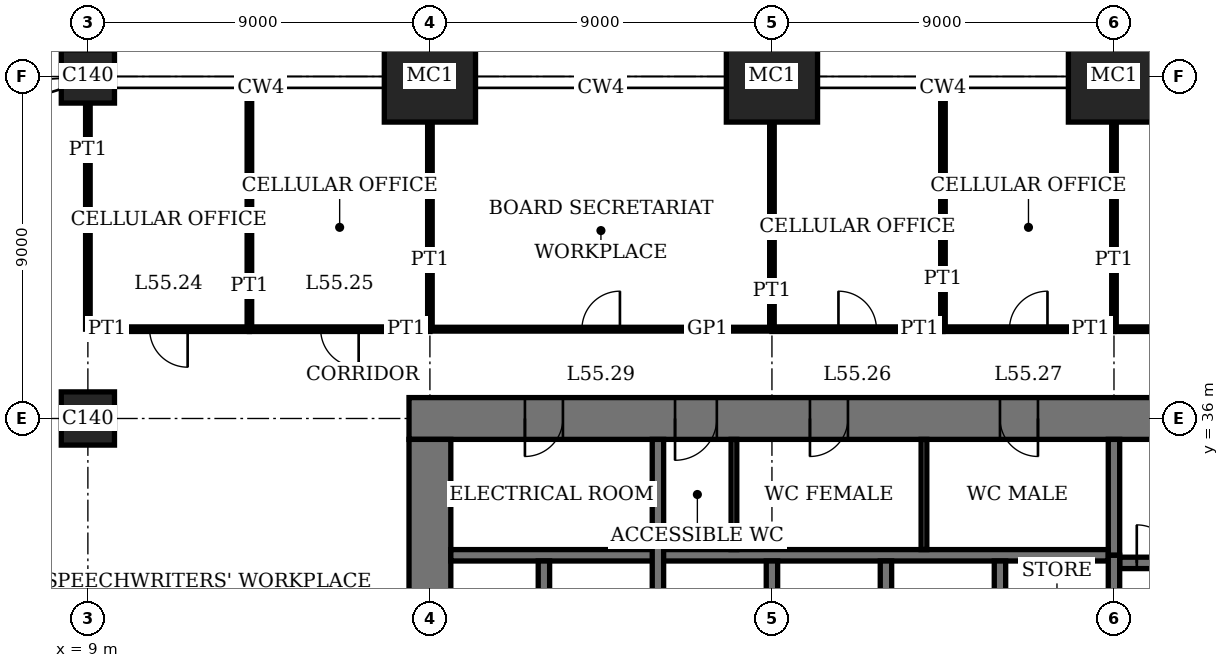
"""IFC4 building model, lengths in metres.
Left out: names, types, materials, properties, quantities, classifications, styles, units other than length and angle.
Written with IfcOpenShell. Run it as: python <this file> out.ifc"""

import sys

from ifc_helpers import new_model, si_unit, direction, frame, frame_2d, origin, origin_2d, place, context, subcontext, project, spatial, rectangle, extrude, element, fill, save


model = new_model("IFC4")
c1 = context("Model", 3, precision=1e-05, world=origin(), true_north=direction((0.0, 1.0)))
c2 = subcontext(c1, "Body", "Model", "MODEL_VIEW")
j1 = project(units=[si_unit("LENGTHUNIT", "METRE"), si_unit("PLANEANGLEUNIT", "RADIAN")], contexts=[c1])
p1 = place(None, origin())
s1 = spatial("IfcSite", under=j1, at=p1, CompositionType="ELEMENT")
p2 = place(p1, origin())
s2 = spatial("IfcBuilding", under=s1, at=p2, CompositionType="ELEMENT")
p3 = place(p2, frame((0.0, 0.0, 226.2)))
s3 = spatial("IfcBuildingStorey", under=s2, at=p3, CompositionType="ELEMENT", Elevation=226.2)
for number, where, z_axis, x_axis in (
    (1, (9.0, 36.0, 0.0), (0.0, 0.0, 1.0), (1.0, 0.0, 0.0)),
    (2, (9.0, 45.0, 0.0), (0.0, 0.0, 1.0), (1.0, 0.0, 0.0)),
):
    element("IfcColumn", number, at=place(p3, frame(where, z_axis=z_axis, x_axis=x_axis)), inside=s3, PredefinedType="COLUMN", context=c2, shape_type="SweptSolid", body=[
        extrude(rectangle(XDim=1.4, YDim=1.4, at=origin_2d()), origin(), (0.0, 0.0, 1.0), 4.0),
    ])
for number, where, z_axis, x_axis in (
    (3, (18.0, 45.0, 0.0), (0.0, 0.0, 1.0), (1.0, 0.0, 0.0)),
    (4, (27.0, 45.0, 0.0), (0.0, 0.0, 1.0), (1.0, 0.0, 0.0)),
    (5, (36.0, 45.0, 0.0), (0.0, 0.0, 1.0), (1.0, 0.0, 0.0)),
):
    element("IfcColumn", number, at=place(p3, frame(where, z_axis=z_axis, x_axis=x_axis)), inside=s3, PredefinedType="COLUMN", context=c2, shape_type="SweptSolid", body=[
        extrude(rectangle(XDim=2.4, YDim=2.4, at=origin_2d()), origin(), (0.0, 0.0, 1.0), 4.0),
    ])
p4 = place(p3, frame((45.55, 36.0, 0.0), z_axis=(0.0, 0.0, 1.0), x_axis=(-1.0, 0.0, 0.0)))
e6 = element("IfcWall", 6, at=p4, inside=s3, PredefinedType="SHEAR", context=c2, shape_type="SweptSolid", body=[
    extrude(rectangle(XDim=28.1, YDim=1.1, at=frame_2d((14.05, 0.0))), origin(), (0.0, 0.0, 1.0), 4.0),
])
p5 = place(p4, frame((11.55, 0.0, 0.0)))
e7 = element("IfcOpeningElement", 7, at=p5, cuts=e6, PredefinedType="OPENING", context=c2, shape_type="SweptSolid", body=[
    extrude(rectangle(XDim=1.0, YDim=2.4, at=frame_2d((0.5, 1.2))), frame((0.0, 0.56, 0.0), z_axis=(0.0, -1.0, 0.0), x_axis=(1.0, 0.0, 0.0)), (0.0, 0.0, 1.0), 1.12),
])
p6 = place(p4, frame((16.55, 0.0, 0.0)))
e8 = element("IfcOpeningElement", 8, at=p6, cuts=e6, PredefinedType="OPENING", context=c2, shape_type="SweptSolid", body=[
    extrude(rectangle(XDim=1.0, YDim=2.4, at=frame_2d((0.5, 1.2))), frame((0.0, 0.56, 0.0), z_axis=(0.0, -1.0, 0.0), x_axis=(1.0, 0.0, 0.0)), (0.0, 0.0, 1.0), 1.12),
])
p7 = place(p4, frame((20.0, 0.0, 0.0)))
e9 = element("IfcOpeningElement", 9, at=p7, cuts=e6, PredefinedType="OPENING", context=c2, shape_type="SweptSolid", body=[
    extrude(rectangle(XDim=1.1, YDim=2.4, at=frame_2d((0.55, 1.2))), frame((0.0, 0.56, 0.0), z_axis=(0.0, -1.0, 0.0), x_axis=(1.0, 0.0, 0.0)), (0.0, 0.0, 1.0), 1.12),
])
p8 = place(p4, frame((24.05, 0.0, 0.0)))
e10 = element("IfcOpeningElement", 10, at=p8, cuts=e6, PredefinedType="OPENING", context=c2, shape_type="SweptSolid", body=[
    extrude(rectangle(XDim=1.0, YDim=2.4, at=frame_2d((0.5, 1.2))), frame((0.0, 0.56, 0.0), z_axis=(0.0, -1.0, 0.0), x_axis=(1.0, 0.0, 0.0)), (0.0, 0.0, 1.0), 1.12),
])
p9 = place(p3, frame((18.0, 35.45, 0.0), z_axis=(0.0, 0.0, 1.0), x_axis=(0.0, -1.0, 0.0)))
e11 = element("IfcWall", 11, at=p9, inside=s3, PredefinedType="SHEAR", context=c2, shape_type="SweptSolid", body=[
    extrude(rectangle(XDim=16.9, YDim=1.1, at=frame_2d((8.45, 0.0))), origin(), (0.0, 0.0, 1.0), 4.0),
])
p10 = place(p9, frame((8.45, 0.0, 0.0)))
e12 = element("IfcOpeningElement", 12, at=p10, cuts=e11, PredefinedType="OPENING", context=c2, shape_type="SweptSolid", body=[
    extrude(rectangle(XDim=1.8, YDim=2.4, at=frame_2d((0.9, 1.2))), frame((0.0, 0.56, 0.0), z_axis=(0.0, -1.0, 0.0), x_axis=(1.0, 0.0, 0.0)), (0.0, 0.0, 1.0), 1.12),
])
p11 = place(p3, frame((36.15, 32.2, 0.0), z_axis=(0.0, 0.0, 1.0), x_axis=(1.0, 0.0, 0.0)))
e13 = element("IfcWall", 13, at=p11, inside=s3, PredefinedType="SHEAR", context=c2, shape_type="SweptSolid", body=[
    extrude(rectangle(XDim=8.3, YDim=0.3, at=frame_2d((4.15, 0.0))), origin(), (0.0, 0.0, 1.0), 4.0),
])
p12 = place(p11, frame((0.45, 0.0, 0.0)))
e14 = element("IfcOpeningElement", 14, at=p12, cuts=e13, PredefinedType="OPENING", context=c2, shape_type="SweptSolid", body=[
    extrude(rectangle(XDim=1.0, YDim=2.4, at=frame_2d((0.5, 1.2))), frame((0.0, 0.16, 0.0), z_axis=(0.0, -1.0, 0.0), x_axis=(1.0, 0.0, 0.0)), (0.0, 0.0, 1.0), 0.32),
])
p13 = place(p3, frame((36.0, 32.4, 0.0), z_axis=(0.0, 0.0, 1.0), x_axis=(0.0, 1.0, 0.0)))
e15 = element("IfcWall", 15, at=p13, inside=s3, PredefinedType="SHEAR", context=c2, shape_type="SweptSolid", body=[
    extrude(rectangle(XDim=3.05, YDim=0.3, at=frame_2d((1.525, 0.0))), origin(), (0.0, 0.0, 1.0), 4.0),
])
p14 = place(p3, frame((18.55, 32.4, 0.0), z_axis=(0.0, 0.0, 1.0), x_axis=(1.0, 0.0, 0.0)))
e16 = element("IfcWall", 16, at=p14, inside=s3, PredefinedType="SHEAR", context=c2, shape_type="SweptSolid", body=[
    extrude(rectangle(XDim=17.3, YDim=0.3, at=frame_2d((8.65, 0.0))), origin(), (0.0, 0.0, 1.0), 4.0),
])
for number, where, z_axis, x_axis in (
    (17, (33.0, 29.55, 0.0), (0.0, 0.0, 1.0), (0.0, 1.0, 0.0)),
    (18, (30.0, 29.55, 0.0), (0.0, 0.0, 1.0), (0.0, 1.0, 0.0)),
    (19, (27.0, 29.55, 0.0), (0.0, 0.0, 1.0), (0.0, 1.0, 0.0)),
):
    element("IfcWall", number, at=place(p3, frame(where, z_axis=z_axis, x_axis=x_axis)), inside=s3, PredefinedType="SHEAR", context=c2, shape_type="SweptSolid", body=[
        extrude(rectangle(XDim=2.7, YDim=0.3, at=frame_2d((1.35, 0.0))), origin(), (0.0, 0.0, 1.0), 4.0),
    ])
p15 = place(p3, frame((24.0, 29.55, 0.0), z_axis=(0.0, 0.0, 1.0), x_axis=(0.0, 1.0, 0.0)))
e20 = element("IfcWall", 20, at=p15, inside=s3, PredefinedType="SHEAR", context=c2, shape_type="SweptSolid", body=[
    extrude(rectangle(XDim=5.9, YDim=0.3, at=frame_2d((2.95, 0.0))), origin(), (0.0, 0.0, 1.0), 4.0),
])
p16 = place(p3, frame((21.0, 29.55, 0.0), z_axis=(0.0, 0.0, 1.0), x_axis=(0.0, 1.0, 0.0)))
e21 = element("IfcWall", 21, at=p16, inside=s3, PredefinedType="SHEAR", context=c2, shape_type="SweptSolid", body=[
    extrude(rectangle(XDim=2.7, YDim=0.3, at=frame_2d((1.35, 0.0))), origin(), (0.0, 0.0, 1.0), 4.0),
])
p17 = place(p3, frame((36.0, 29.55, 0.0), z_axis=(0.0, 0.0, 1.0), x_axis=(0.0, 1.0, 0.0)))
e22 = element("IfcWall", 22, at=p17, inside=s3, PredefinedType="SHEAR", context=c2, shape_type="SweptSolid", body=[
    extrude(rectangle(XDim=2.85, YDim=0.3, at=frame_2d((1.425, 0.0))), origin(), (0.0, 0.0, 1.0), 4.0),
])
p18 = place(p3, frame((9.0, 38.35, 0.0), z_axis=(0.0, 0.0, 1.0), x_axis=(1.0, 0.0, 0.0)))
e23 = element("IfcWall", 23, at=p18, inside=s3, PredefinedType="PARTITIONING", context=c2, shape_type="SweptSolid", body=[
    extrude(rectangle(XDim=4.25, YDim=0.12, at=frame_2d((2.125, 0.0))), origin(), (0.0, 0.0, 1.0), 3.75),
])
p19 = place(p18, frame((1.625, 0.0, 0.0)))
e24 = element("IfcOpeningElement", 24, at=p19, cuts=e23, PredefinedType="OPENING", context=c2, shape_type="SweptSolid", body=[
    extrude(rectangle(XDim=1.0, YDim=2.4, at=frame_2d((0.5, 1.2))), frame((0.0, 0.07, 0.0), z_axis=(0.0, -1.0, 0.0), x_axis=(1.0, 0.0, 0.0)), (0.0, 0.0, 1.0), 0.14),
])
p20 = place(p3, frame((13.25, 38.35, 0.0), z_axis=(0.0, 0.0, 1.0), x_axis=(1.0, 0.0, 0.0)))
e25 = element("IfcWall", 25, at=p20, inside=s3, PredefinedType="PARTITIONING", context=c2, shape_type="SweptSolid", body=[
    extrude(rectangle(XDim=4.75, YDim=0.12, at=frame_2d((2.375, 0.0))), origin(), (0.0, 0.0, 1.0), 3.75),
])
p21 = place(p20, frame((1.875, 0.0, 0.0)))
e26 = element("IfcOpeningElement", 26, at=p21, cuts=e25, PredefinedType="OPENING", context=c2, shape_type="SweptSolid", body=[
    extrude(rectangle(XDim=1.0, YDim=2.4, at=frame_2d((0.5, 1.2))), frame((0.0, 0.07, 0.0), z_axis=(0.0, -1.0, 0.0), x_axis=(1.0, 0.0, 0.0)), (0.0, 0.0, 1.0), 0.14),
])
p22 = place(p3, frame((27.0, 38.35, 0.0), z_axis=(0.0, 0.0, 1.0), x_axis=(1.0, 0.0, 0.0)))
e27 = element("IfcWall", 27, at=p22, inside=s3, PredefinedType="PARTITIONING", context=c2, shape_type="SweptSolid", body=[
    extrude(rectangle(XDim=4.5, YDim=0.12, at=frame_2d((2.25, 0.0))), origin(), (0.0, 0.0, 1.0), 3.75),
])
p23 = place(p22, frame((1.75, 0.0, 0.0)))
e28 = element("IfcOpeningElement", 28, at=p23, cuts=e27, PredefinedType="OPENING", context=c2, shape_type="SweptSolid", body=[
    extrude(rectangle(XDim=1.0, YDim=2.4, at=frame_2d((0.5, 1.2))), frame((0.0, 0.07, 0.0), z_axis=(0.0, -1.0, 0.0), x_axis=(1.0, 0.0, 0.0)), (0.0, 0.0, 1.0), 0.14),
])
p24 = place(p3, frame((31.5, 38.35, 0.0), z_axis=(0.0, 0.0, 1.0), x_axis=(1.0, 0.0, 0.0)))
e29 = element("IfcWall", 29, at=p24, inside=s3, PredefinedType="PARTITIONING", context=c2, shape_type="SweptSolid", body=[
    extrude(rectangle(XDim=4.5, YDim=0.12, at=frame_2d((2.25, 0.0))), origin(), (0.0, 0.0, 1.0), 3.75),
])
p25 = place(p24, frame((1.75, 0.0, 0.0)))
e30 = element("IfcOpeningElement", 30, at=p25, cuts=e29, PredefinedType="OPENING", context=c2, shape_type="SweptSolid", body=[
    extrude(rectangle(XDim=1.0, YDim=2.4, at=frame_2d((0.5, 1.2))), frame((0.0, 0.07, 0.0), z_axis=(0.0, -1.0, 0.0), x_axis=(1.0, 0.0, 0.0)), (0.0, 0.0, 1.0), 0.14),
])
p26 = place(p3, frame((36.0, 38.35, 0.0), z_axis=(0.0, 0.0, 1.0), x_axis=(1.0, 0.0, 0.0)))
e31 = element("IfcWall", 31, at=p26, inside=s3, PredefinedType="PARTITIONING", context=c2, shape_type="SweptSolid", body=[
    extrude(rectangle(XDim=9.0, YDim=0.12, at=frame_2d((4.5, 0.0))), origin(), (0.0, 0.0, 1.0), 3.75),
])
p27 = place(p26, frame((4.0, 0.0, 0.0)))
e32 = element("IfcOpeningElement", 32, at=p27, cuts=e31, PredefinedType="OPENING", context=c2, shape_type="SweptSolid", body=[
    extrude(rectangle(XDim=1.0, YDim=2.4, at=frame_2d((0.5, 1.2))), frame((0.0, 0.07, 0.0), z_axis=(0.0, -1.0, 0.0), x_axis=(1.0, 0.0, 0.0)), (0.0, 0.0, 1.0), 0.14),
])
p28 = place(p3, frame((18.0, 38.35, 0.0), z_axis=(0.0, 0.0, 1.0), x_axis=(1.0, 0.0, 0.0)))
e33 = element("IfcWall", 33, at=p28, inside=s3, PredefinedType="PARTITIONING", context=c2, shape_type="SweptSolid", body=[
    extrude(rectangle(XDim=9.0, YDim=0.1, at=frame_2d((4.5, 0.0))), origin(), (0.0, 0.0, 1.0), 3.75),
])
p29 = place(p28, frame((4.0, 0.0, 0.0)))
e34 = element("IfcOpeningElement", 34, at=p29, cuts=e33, PredefinedType="OPENING", context=c2, shape_type="SweptSolid", body=[
    extrude(rectangle(XDim=1.0, YDim=2.4, at=frame_2d((0.5, 1.2))), frame((0.0, 0.06, 0.0), z_axis=(0.0, -1.0, 0.0), x_axis=(1.0, 0.0, 0.0)), (0.0, 0.0, 1.0), 0.12),
])
p30 = place(p3, frame((9.0, 38.35, 0.0), z_axis=(0.0, 0.0, 1.0), x_axis=(0.0, 1.0, 0.0)))
e35 = element("IfcWall", 35, at=p30, inside=s3, PredefinedType="PARTITIONING", context=c2, shape_type="SweptSolid", body=[
    extrude(rectangle(XDim=5.95, YDim=0.12, at=frame_2d((2.975, 0.0))), origin(), (0.0, 0.0, 1.0), 3.05),
])
p31 = place(p3, frame((13.25, 38.35, 0.0), z_axis=(0.0, 0.0, 1.0), x_axis=(0.0, 1.0, 0.0)))
e36 = element("IfcWall", 36, at=p31, inside=s3, PredefinedType="PARTITIONING", context=c2, shape_type="SweptSolid", body=[
    extrude(rectangle(XDim=6.34, YDim=0.12, at=frame_2d((3.17, 0.0))), origin(), (0.0, 0.0, 1.0), 3.75),
])
for number, where, z_axis, x_axis in (
    (37, (18.0, 38.35, 0.0), (0.0, 0.0, 1.0), (0.0, 1.0, 0.0)),
    (38, (27.0, 38.35, 0.0), (0.0, 0.0, 1.0), (0.0, 1.0, 0.0)),
):
    element("IfcWall", number, at=place(p3, frame(where, z_axis=z_axis, x_axis=x_axis)), inside=s3, PredefinedType="PARTITIONING", context=c2, shape_type="SweptSolid", body=[
        extrude(rectangle(XDim=5.45, YDim=0.12, at=frame_2d((2.725, 0.0))), origin(), (0.0, 0.0, 1.0), 3.05),
    ])
p32 = place(p3, frame((31.5, 38.35, 0.0), z_axis=(0.0, 0.0, 1.0), x_axis=(0.0, 1.0, 0.0)))
e39 = element("IfcWall", 39, at=p32, inside=s3, PredefinedType="PARTITIONING", context=c2, shape_type="SweptSolid", body=[
    extrude(rectangle(XDim=6.34, YDim=0.12, at=frame_2d((3.17, 0.0))), origin(), (0.0, 0.0, 1.0), 3.75),
])
p33 = place(p3, frame((36.0, 38.35, 0.0), z_axis=(0.0, 0.0, 1.0), x_axis=(0.0, 1.0, 0.0)))
e40 = element("IfcWall", 40, at=p33, inside=s3, PredefinedType="PARTITIONING", context=c2, shape_type="SweptSolid", body=[
    extrude(rectangle(XDim=5.45, YDim=0.12, at=frame_2d((2.725, 0.0))), origin(), (0.0, 0.0, 1.0), 3.05),
])
for number, where, z_axis, x_axis in (
    (41, (31.0, 32.55, 0.0), (0.0, 0.0, 1.0), (0.0, 1.0, 0.0)),
    (42, (26.0, 32.55, 0.0), (0.0, 0.0, 1.0), (0.0, 1.0, 0.0)),
):
    element("IfcWall", number, at=place(p3, frame(where, z_axis=z_axis, x_axis=x_axis)), inside=s3, PredefinedType="PARTITIONING", context=c2, shape_type="SweptSolid", body=[
        extrude(rectangle(XDim=2.9, YDim=0.15, at=frame_2d((1.45, 0.0))), origin(), (0.0, 0.0, 1.0), 3.75),
    ])
p34 = place(p5, origin())
e43 = element("IfcDoor", 43, at=p34, inside=s3, OperationType="SINGLE_SWING_RIGHT", PredefinedType="DOOR", context=c2, shape_type="SweptSolid", body=[
    extrude(rectangle(XDim=1.0, YDim=2.4, at=frame_2d((0.5, 1.2))), frame((0.0, 0.025, 0.0), z_axis=(0.0, -1.0, 0.0), x_axis=(1.0, 0.0, 0.0)), (0.0, 0.0, 1.0), 0.05),
    extrude(rectangle(XDim=0.04, YDim=2.4, at=frame_2d((0.02, 1.2))), frame((0.0, 0.4, 0.0), z_axis=(0.0, -1.0, 0.0), x_axis=(1.0, 0.0, 0.0)), (0.0, 0.0, 1.0), 0.8),
    extrude(rectangle(XDim=0.04, YDim=2.4, at=frame_2d((0.98, 1.2))), frame((0.0, 0.4, 0.0), z_axis=(0.0, -1.0, 0.0), x_axis=(1.0, 0.0, 0.0)), (0.0, 0.0, 1.0), 0.8),
    extrude(rectangle(XDim=1.0, YDim=0.04, at=frame_2d((0.5, 2.38))), frame((0.0, 0.4, 0.0), z_axis=(0.0, -1.0, 0.0), x_axis=(1.0, 0.0, 0.0)), (0.0, 0.0, 1.0), 0.8),
])
fill(e7, e43)
p35 = place(p6, origin())
e44 = element("IfcDoor", 44, at=p35, inside=s3, OperationType="SINGLE_SWING_LEFT", PredefinedType="DOOR", context=c2, shape_type="SweptSolid", body=[
    extrude(rectangle(XDim=1.0, YDim=2.4, at=frame_2d((0.5, 1.2))), frame((0.0, 0.025, 0.0), z_axis=(0.0, -1.0, 0.0), x_axis=(1.0, 0.0, 0.0)), (0.0, 0.0, 1.0), 0.05),
    extrude(rectangle(XDim=0.04, YDim=2.4, at=frame_2d((0.02, 1.2))), frame((0.0, 0.4, 0.0), z_axis=(0.0, -1.0, 0.0), x_axis=(1.0, 0.0, 0.0)), (0.0, 0.0, 1.0), 0.8),
    extrude(rectangle(XDim=0.04, YDim=2.4, at=frame_2d((0.98, 1.2))), frame((0.0, 0.4, 0.0), z_axis=(0.0, -1.0, 0.0), x_axis=(1.0, 0.0, 0.0)), (0.0, 0.0, 1.0), 0.8),
    extrude(rectangle(XDim=1.0, YDim=0.04, at=frame_2d((0.5, 2.38))), frame((0.0, 0.4, 0.0), z_axis=(0.0, -1.0, 0.0), x_axis=(1.0, 0.0, 0.0)), (0.0, 0.0, 1.0), 0.8),
])
fill(e8, e44)
p36 = place(p7, origin())
e45 = element("IfcDoor", 45, at=p36, inside=s3, OperationType="SINGLE_SWING_LEFT", PredefinedType="DOOR", context=c2, shape_type="SweptSolid", body=[
    extrude(rectangle(XDim=1.1, YDim=2.4, at=frame_2d((0.55, 1.2))), frame((0.0, 0.025, 0.0), z_axis=(0.0, -1.0, 0.0), x_axis=(1.0, 0.0, 0.0)), (0.0, 0.0, 1.0), 0.05),
    extrude(rectangle(XDim=0.04, YDim=2.4, at=frame_2d((0.02, 1.2))), frame((0.0, 0.44, 0.0), z_axis=(0.0, -1.0, 0.0), x_axis=(1.0, 0.0, 0.0)), (0.0, 0.0, 1.0), 0.88),
    extrude(rectangle(XDim=0.04, YDim=2.4, at=frame_2d((1.08, 1.2))), frame((0.0, 0.44, 0.0), z_axis=(0.0, -1.0, 0.0), x_axis=(1.0, 0.0, 0.0)), (0.0, 0.0, 1.0), 0.88),
    extrude(rectangle(XDim=1.1, YDim=0.04, at=frame_2d((0.55, 2.38))), frame((0.0, 0.44, 0.0), z_axis=(0.0, -1.0, 0.0), x_axis=(1.0, 0.0, 0.0)), (0.0, 0.0, 1.0), 0.88),
])
fill(e9, e45)
p37 = place(p8, origin())
e46 = element("IfcDoor", 46, at=p37, inside=s3, OperationType="SINGLE_SWING_LEFT", PredefinedType="DOOR", context=c2, shape_type="SweptSolid", body=[
    extrude(rectangle(XDim=1.0, YDim=2.4, at=frame_2d((0.5, 1.2))), frame((0.0, 0.025, 0.0), z_axis=(0.0, -1.0, 0.0), x_axis=(1.0, 0.0, 0.0)), (0.0, 0.0, 1.0), 0.05),
    extrude(rectangle(XDim=0.04, YDim=2.4, at=frame_2d((0.02, 1.2))), frame((0.0, 0.4, 0.0), z_axis=(0.0, -1.0, 0.0), x_axis=(1.0, 0.0, 0.0)), (0.0, 0.0, 1.0), 0.8),
    extrude(rectangle(XDim=0.04, YDim=2.4, at=frame_2d((0.98, 1.2))), frame((0.0, 0.4, 0.0), z_axis=(0.0, -1.0, 0.0), x_axis=(1.0, 0.0, 0.0)), (0.0, 0.0, 1.0), 0.8),
    extrude(rectangle(XDim=1.0, YDim=0.04, at=frame_2d((0.5, 2.38))), frame((0.0, 0.4, 0.0), z_axis=(0.0, -1.0, 0.0), x_axis=(1.0, 0.0, 0.0)), (0.0, 0.0, 1.0), 0.8),
])
fill(e10, e46)
p38 = place(p12, origin())
e47 = element("IfcDoor", 47, at=p38, inside=s3, OperationType="SINGLE_SWING_RIGHT", PredefinedType="DOOR", context=c2, shape_type="SweptSolid", body=[
    extrude(rectangle(XDim=1.0, YDim=2.4, at=frame_2d((0.5, 1.2))), frame((0.0, 0.03, 0.0), z_axis=(0.0, -1.0, 0.0), x_axis=(1.0, 0.0, 0.0)), (0.0, 0.0, 1.0), 0.06),
])
fill(e14, e47)
p39 = place(p19, origin())
e48 = element("IfcDoor", 48, at=p39, inside=s3, OperationType="SINGLE_SWING_RIGHT", PredefinedType="DOOR", context=c2, shape_type="SweptSolid", body=[
    extrude(rectangle(XDim=1.0, YDim=2.4, at=frame_2d((0.5, 1.2))), frame((0.0, 0.025, 0.0), z_axis=(0.0, -1.0, 0.0), x_axis=(1.0, 0.0, 0.0)), (0.0, 0.0, 1.0), 0.05),
])
fill(e24, e48)
p40 = place(p21, origin())
e49 = element("IfcDoor", 49, at=p40, inside=s3, OperationType="SINGLE_SWING_RIGHT", PredefinedType="DOOR", context=c2, shape_type="SweptSolid", body=[
    extrude(rectangle(XDim=1.0, YDim=2.4, at=frame_2d((0.5, 1.2))), frame((0.0, 0.025, 0.0), z_axis=(0.0, -1.0, 0.0), x_axis=(1.0, 0.0, 0.0)), (0.0, 0.0, 1.0), 0.05),
])
fill(e26, e49)
p41 = place(p23, origin())
e50 = element("IfcDoor", 50, at=p41, inside=s3, OperationType="SINGLE_SWING_RIGHT", PredefinedType="DOOR", context=c2, shape_type="SweptSolid", body=[
    extrude(rectangle(XDim=1.0, YDim=2.4, at=frame_2d((0.5, 1.2))), frame((0.0, 0.025, 0.0), z_axis=(0.0, -1.0, 0.0), x_axis=(1.0, 0.0, 0.0)), (0.0, 0.0, 1.0), 0.05),
])
fill(e28, e50)
p42 = place(p25, origin())
e51 = element("IfcDoor", 51, at=p42, inside=s3, OperationType="SINGLE_SWING_LEFT", PredefinedType="DOOR", context=c2, shape_type="SweptSolid", body=[
    extrude(rectangle(XDim=1.0, YDim=2.4, at=frame_2d((0.5, 1.2))), frame((0.0, 0.025, 0.0), z_axis=(0.0, -1.0, 0.0), x_axis=(1.0, 0.0, 0.0)), (0.0, 0.0, 1.0), 0.05),
])
fill(e30, e51)
p43 = place(p29, origin())
e52 = element("IfcDoor", 52, at=p43, inside=s3, OperationType="SINGLE_SWING_LEFT", PredefinedType="DOOR", context=c2, shape_type="SweptSolid", body=[
    extrude(rectangle(XDim=1.0, YDim=2.4, at=frame_2d((0.5, 1.2))), frame((0.0, 0.02, 0.0), z_axis=(0.0, -1.0, 0.0), x_axis=(1.0, 0.0, 0.0)), (0.0, 0.0, 1.0), 0.04),
])
fill(e34, e52)
save(model, sys.argv[1])
